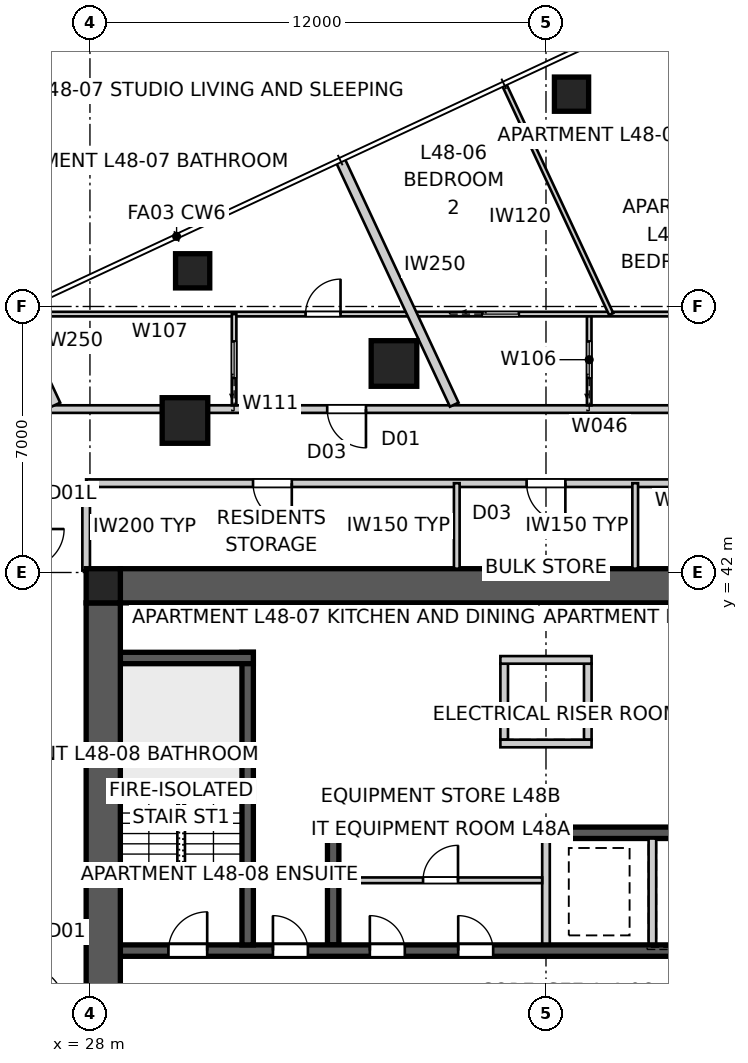
"""IFC4 building model, lengths in metres.
Left out: names, types, materials, properties, quantities, classifications, styles, units other than length and angle.
Written with IfcOpenShell. Run it as: python <this file> out.ifc"""

import sys

from ifc_helpers import new_model, si_unit, direction, frame, frame_2d, origin, origin_2d, place, context, subcontext, project, spatial, polyline, rectangle, outline, extrude, element, fill, save


model = new_model("IFC4")
c1 = context("Model", 3, precision=1e-05, world=origin(), true_north=direction((0.0, 1.0)))
c2 = subcontext(c1, "Body", "Model", "MODEL_VIEW")
j1 = project(units=[si_unit("LENGTHUNIT", "METRE"), si_unit("PLANEANGLEUNIT", "RADIAN")], contexts=[c1])
p1 = place(None, origin())
s1 = spatial("IfcSite", under=j1, at=p1, CompositionType="ELEMENT")
p2 = place(p1, origin())
s2 = spatial("IfcBuilding", under=s1, at=p2, CompositionType="ELEMENT")
p3 = place(p2, frame((0.0, 0.0, 176.0)))
s3 = spatial("IfcBuildingStorey", under=s2, at=p3, CompositionType="ELEMENT", Elevation=176.0)
p4 = place(p3, frame((28.8, 41.65, 0.0), z_axis=(0.0, 0.0, 1.0), x_axis=(1.0, 0.0, 0.0)))
e1 = element("IfcWall", 1, at=p4, inside=s3, PredefinedType="SHEAR", context=c2, shape_type="SweptSolid", body=[
    extrude(outline(polyline([(0.0, -0.45), (22.4, -0.45), (22.4, -0.025), (22.85, -0.025), (22.85, 0.025), (22.4, 0.025), (22.4, 0.45), (0.0, 0.45), (0.0, 0.025), (-0.45, 0.025), (-0.45, -0.025), (0.0, -0.025), (0.0, -0.45)])), origin(), (0.0, 0.0, 1.0), 3.4),
])
p5 = place(p3, frame((28.35, 41.2, 0.0), z_axis=(0.0, 0.0, 1.0), x_axis=(0.0, -1.0, 0.0)))
e2 = element("IfcWall", 2, at=p5, inside=s3, PredefinedType="SHEAR", context=c2, shape_type="SweptSolid", body=[
    extrude(outline(polyline([(0.0, -0.45), (22.4, -0.45), (22.4, -0.025), (22.85, -0.025), (22.85, 0.025), (22.4, 0.025), (22.4, 0.45), (0.0, 0.45), (0.0, 0.025), (-0.45, 0.025), (-0.45, -0.025), (0.0, -0.025), (0.0, -0.45)])), origin(), (0.0, 0.0, 1.0), 3.4),
])
p6 = place(p5, frame((11.14, 0.0, 0.0)))
e3 = element("IfcOpeningElement", 3, at=p6, cuts=e2, PredefinedType="OPENING", context=c2, shape_type="SweptSolid", body=[
    extrude(rectangle(XDim=1.02, YDim=2.4, at=frame_2d((0.51, 1.2))), frame((0.0, 0.46, 0.0), z_axis=(0.0, -1.0, 0.0), x_axis=(1.0, 0.0, 0.0)), (0.0, 0.0, 1.0), 0.92),
])
p7 = place(p3, frame((28.8, 32.05, 0.0), z_axis=(0.0, 0.0, 1.0), x_axis=(1.0, 0.0, 0.0)))
e4 = element("IfcWall", 4, at=p7, inside=s3, PredefinedType="SHEAR", context=c2, shape_type="SweptSolid", body=[
    extrude(rectangle(XDim=22.4, YDim=0.3, at=frame_2d((11.2, 0.0))), origin(), (0.0, 0.0, 1.0), 3.4),
])
p8 = place(p7, frame((19.04, 0.0, 0.0)))
e5 = element("IfcOpeningElement", 5, at=p8, cuts=e4, PredefinedType="OPENING", context=c2, shape_type="SweptSolid", body=[
    extrude(rectangle(XDim=0.92, YDim=2.1, at=frame_2d((0.46, 1.05))), frame((0.0, 0.16, 0.0), z_axis=(0.0, -1.0, 0.0), x_axis=(1.0, 0.0, 0.0)), (0.0, 0.0, 1.0), 0.32),
])
p9 = place(p7, frame((1.265, 0.0, 0.0)))
e6 = element("IfcOpeningElement", 6, at=p9, cuts=e4, PredefinedType="OPENING", context=c2, shape_type="SweptSolid", body=[
    extrude(rectangle(XDim=1.02, YDim=2.1, at=frame_2d((0.51, 1.05))), frame((0.0, 0.16, 0.0), z_axis=(0.0, -1.0, 0.0), x_axis=(1.0, 0.0, 0.0)), (0.0, 0.0, 1.0), 0.32),
])
p10 = place(p7, frame((4.015, 0.0, 0.0)))
e7 = element("IfcOpeningElement", 7, at=p10, cuts=e4, PredefinedType="OPENING", context=c2, shape_type="SweptSolid", body=[
    extrude(rectangle(XDim=0.92, YDim=2.1, at=frame_2d((0.46, 1.05))), frame((0.0, 0.16, 0.0), z_axis=(0.0, -1.0, 0.0), x_axis=(1.0, 0.0, 0.0)), (0.0, 0.0, 1.0), 0.32),
])
p11 = place(p7, frame((6.565, 0.0, 0.0)))
e8 = element("IfcOpeningElement", 8, at=p11, cuts=e4, PredefinedType="OPENING", context=c2, shape_type="SweptSolid", body=[
    extrude(rectangle(XDim=0.92, YDim=2.1, at=frame_2d((0.46, 1.05))), frame((0.0, 0.16, 0.0), z_axis=(0.0, -1.0, 0.0), x_axis=(1.0, 0.0, 0.0)), (0.0, 0.0, 1.0), 0.32),
])
p12 = place(p7, frame((8.89, 0.0, 0.0)))
e9 = element("IfcOpeningElement", 9, at=p12, cuts=e4, PredefinedType="OPENING", context=c2, shape_type="SweptSolid", body=[
    extrude(rectangle(XDim=0.92, YDim=2.1, at=frame_2d((0.46, 1.05))), frame((0.0, 0.16, 0.0), z_axis=(0.0, -1.0, 0.0), x_axis=(1.0, 0.0, 0.0)), (0.0, 0.0, 1.0), 0.32),
])
p13 = place(p7, frame((14.85, 0.0, 0.0)))
e10 = element("IfcOpeningElement", 10, at=p13, cuts=e4, PredefinedType="OPENING", context=c2, shape_type="SweptSolid", body=[
    extrude(rectangle(XDim=1.1, YDim=2.1, at=frame_2d((0.55, 1.05))), frame((0.0, 0.16, 0.0), z_axis=(0.0, -1.0, 0.0), x_axis=(1.0, 0.0, 0.0)), (0.0, 0.0, 1.0), 0.32),
])
p14 = place(p3, frame((34.25, 35.15, 0.0), z_axis=(0.0, 0.0, 1.0), x_axis=(1.0, 0.0, 0.0)))
e11 = element("IfcWall", 11, at=p14, inside=s3, PredefinedType="SHEAR", context=c2, shape_type="SweptSolid", body=[
    extrude(rectangle(XDim=11.5, YDim=0.3, at=frame_2d((5.75, 0.0))), origin(), (0.0, 0.0, 1.0), 3.4),
])
p15 = place(p3, frame((34.4, 32.2, 0.0), z_axis=(0.0, 0.0, 1.0), x_axis=(0.0, 1.0, 0.0)))
e12 = element("IfcWall", 12, at=p15, inside=s3, PredefinedType="SHEAR", context=c2, shape_type="SweptSolid", body=[
    extrude(rectangle(XDim=2.8, YDim=0.3, at=frame_2d((1.4, 0.0))), origin(), (0.0, 0.0, 1.0), 3.4),
])
for number, where, z_axis, x_axis in (
    (13, (40.0, 32.2, 0.0), (0.0, 0.0, 1.0), (0.0, 1.0, 0.0)),
    (14, (42.8, 32.2, 0.0), (0.0, 0.0, 1.0), (0.0, 1.0, 0.0)),
):
    element("IfcWall", number, at=place(p3, frame(where, z_axis=z_axis, x_axis=x_axis)), inside=s3, PredefinedType="SOLIDWALL", context=c2, shape_type="SweptSolid", body=[
        extrude(rectangle(XDim=2.8, YDim=0.2, at=frame_2d((1.4, 0.0))), origin(), (0.0, 0.0, 1.0), 3.4),
    ])
p16 = place(p3, frame((32.15, 32.2, 0.0), z_axis=(0.0, 0.0, 1.0), x_axis=(0.0, 1.0, 0.0)))
e15 = element("IfcWall", 15, at=p16, inside=s3, PredefinedType="SHEAR", context=c2, shape_type="SweptSolid", body=[
    extrude(rectangle(XDim=7.7, YDim=0.3, at=frame_2d((3.85, 0.0))), origin(), (0.0, 0.0, 1.0), 3.4),
])
p17 = place(p3, frame((28.8, 39.75, 0.0), z_axis=(0.0, 0.0, 1.0), x_axis=(1.0, 0.0, 0.0)))
e16 = element("IfcWall", 16, at=p17, inside=s3, PredefinedType="SHEAR", context=c2, shape_type="SweptSolid", body=[
    extrude(rectangle(XDim=3.5, YDim=0.3, at=frame_2d((1.75, 0.0))), origin(), (0.0, 0.0, 1.0), 3.4),
])
for number, where, z_axis, x_axis in (
    (17, (38.9, 37.6, 0.0), (0.0, 0.0, 1.0), (0.0, 1.0, 0.0)),
    (18, (41.1, 37.6, 0.0), (0.0, 0.0, 1.0), (0.0, 1.0, 0.0)),
):
    element("IfcWall", number, at=place(p3, frame(where, z_axis=z_axis, x_axis=x_axis)), inside=s3, PredefinedType="SOLIDWALL", context=c2, shape_type="SweptSolid", body=[
        extrude(rectangle(XDim=2.0, YDim=0.2, at=frame_2d((1.0, 0.0))), origin(), (0.0, 0.0, 1.0), 3.4),
    ])
for number, where, z_axis, x_axis in (
    (19, (38.8, 37.5, 0.0), (0.0, 0.0, 1.0), (1.0, 0.0, 0.0)),
    (20, (38.8, 39.7, 0.0), (0.0, 0.0, 1.0), (1.0, 0.0, 0.0)),
):
    element("IfcWall", number, at=place(p3, frame(where, z_axis=z_axis, x_axis=x_axis)), inside=s3, PredefinedType="SOLIDWALL", context=c2, shape_type="SweptSolid", body=[
        extrude(rectangle(XDim=2.4, YDim=0.2, at=frame_2d((1.2, 0.0))), origin(), (0.0, 0.0, 1.0), 3.4),
    ])
p18 = place(p3, frame((28.35, 41.65, 0.0), z_axis=(0.0, 0.0, 1.0), x_axis=(1.0, 0.0, 0.0)))
e21 = element("IfcColumn", 21, at=p18, inside=s3, PredefinedType="COLUMN", context=c2, shape_type="SweptSolid", body=[
    extrude(rectangle(XDim=0.9, YDim=0.9, at=origin_2d()), origin(), (0.0, 0.0, 1.0), 3.4),
])
for number, where, z_axis, x_axis in (
    (22, (40.672, 54.588, -0.15), (0.0, 0.0, 1.0), (1.0, 0.0, 0.0)),
    (23, (30.702, 49.939, -0.15), (0.0, 0.0, 1.0), (1.0, 0.0, 0.0)),
):
    element("IfcColumn", number, at=place(p3, frame(where, z_axis=z_axis, x_axis=x_axis)), inside=s3, PredefinedType="COLUMN", context=c2, shape_type="SweptSolid", body=[
        extrude(rectangle(XDim=0.9, YDim=0.9, at=origin_2d()), origin(), (0.0, 0.0, 1.0), 3.55),
    ])
for number, where, z_axis, x_axis in (
    (24, (36.0, 47.5, 0.0), (0.0, 0.0, 1.0), (1.0, 0.0, 0.0)),
    (25, (30.5, 46.0, 0.0), (0.0, 0.0, 1.0), (1.0, 0.0, 0.0)),
):
    element("IfcColumn", number, at=place(p3, frame(where, z_axis=z_axis, x_axis=x_axis)), inside=s3, PredefinedType="COLUMN", context=c2, shape_type="SweptSolid", body=[
        extrude(rectangle(XDim=1.2, YDim=1.2, at=origin_2d()), origin(), (0.0, 0.0, 1.0), 3.4),
    ])
p19 = place(p3, frame((47.558, 46.3, 0.0), z_axis=(0.0, 0.0, 1.0), x_axis=(-1.0, 0.0, 0.0)))
e26 = element("IfcWall", 26, at=p19, inside=s3, PredefinedType="PARTITIONING", context=c2, shape_type="SweptSolid", body=[
    extrude(rectangle(XDim=15.117, YDim=0.2, at=frame_2d((7.558, 0.0))), origin(), (0.0, 0.0, 1.0), 3.25),
])
p20 = place(p19, frame((12.295, 0.0, 0.0)))
e27 = element("IfcOpeningElement", 27, at=p20, cuts=e26, PredefinedType="OPENING", context=c2, shape_type="SweptSolid", body=[
    extrude(rectangle(XDim=1.02, YDim=2.34, at=frame_2d((0.51, 1.17))), frame((0.0, 0.11, 0.0), z_axis=(0.0, -1.0, 0.0), x_axis=(1.0, 0.0, 0.0)), (0.0, 0.0, 1.0), 0.22),
])
p21 = place(p3, frame((32.442, 46.3, 0.0), z_axis=(0.0, 0.0, 1.0), x_axis=(-1.0, 0.0, 0.0)))
e28 = element("IfcWall", 28, at=p21, inside=s3, PredefinedType="PARTITIONING", context=c2, shape_type="SweptSolid", body=[
    extrude(rectangle(XDim=1.683, YDim=0.2, at=frame_2d((0.842, 0.0))), origin(), (0.0, 0.0, 1.0), 2.55),
])
p22 = place(p3, frame((30.758, 46.3, 0.0), z_axis=(0.0, 0.0, 1.0), x_axis=(-1.0, 0.0, 0.0)))
e29 = element("IfcWall", 29, at=p22, inside=s3, PredefinedType="PARTITIONING", context=c2, shape_type="SweptSolid", body=[
    extrude(rectangle(XDim=4.458, YDim=0.2, at=frame_2d((2.229, 0.0))), origin(), (0.0, 0.0, 1.0), 3.25),
])
p23 = place(p3, frame((34.585, 52.853, 0.0), z_axis=(0.0, 0.0, 1.0), x_axis=(0.422623839356, -0.906305186131, 0.0)))
e30 = element("IfcWall", 30, at=p23, inside=s3, PredefinedType="PARTITIONING", context=c2, shape_type="SweptSolid", body=[
    extrude(rectangle(XDim=7.101, YDim=0.25, at=frame_2d((3.551, 0.0))), origin(), (0.0, 0.0, 1.0), 3.25),
])
p24 = place(p3, frame((25.975, 48.838, 0.0), z_axis=(0.0, 0.0, 1.0), x_axis=(0.422590257842, -0.906320844943, 0.0)))
e31 = element("IfcWall", 31, at=p24, inside=s3, PredefinedType="PARTITIONING", context=c2, shape_type="SweptSolid", body=[
    extrude(rectangle(XDim=2.671, YDim=0.25, at=frame_2d((1.336, 0.0))), origin(), (0.0, 0.0, 1.0), 3.25),
])
p25 = place(p3, frame((52.1, 44.35, 0.0), z_axis=(0.0, 0.0, 1.0), x_axis=(-1.0, 0.0, 0.0)))
e32 = element("IfcWall", 32, at=p25, inside=s3, PredefinedType="PARTITIONING", context=c2, shape_type="SweptSolid", body=[
    extrude(rectangle(XDim=24.2, YDim=0.2, at=frame_2d((12.1, 0.0))), origin(), (0.0, 0.0, 1.0), 3.25),
])
p26 = place(p25, frame((18.789, 0.0, 0.0)))
e33 = element("IfcOpeningElement", 33, at=p26, cuts=e32, PredefinedType="OPENING", context=c2, shape_type="SweptSolid", body=[
    extrude(rectangle(XDim=1.02, YDim=2.1, at=frame_2d((0.51, 1.05))), frame((0.0, 0.11, 0.0), z_axis=(0.0, -1.0, 0.0), x_axis=(1.0, 0.0, 0.0)), (0.0, 0.0, 1.0), 0.22),
])
p27 = place(p25, frame((4.391, 0.0, 0.0)))
e34 = element("IfcOpeningElement", 34, at=p27, cuts=e32, PredefinedType="OPENING", context=c2, shape_type="SweptSolid", body=[
    extrude(rectangle(XDim=1.02, YDim=2.1, at=frame_2d((0.51, 1.05))), frame((0.0, 0.11, 0.0), z_axis=(0.0, -1.0, 0.0), x_axis=(1.0, 0.0, 0.0)), (0.0, 0.0, 1.0), 0.22),
])
p28 = place(p25, frame((11.59, 0.0, 0.0)))
e35 = element("IfcOpeningElement", 35, at=p28, cuts=e32, PredefinedType="OPENING", context=c2, shape_type="SweptSolid", body=[
    extrude(rectangle(XDim=1.02, YDim=2.1, at=frame_2d((0.51, 1.05))), frame((0.0, 0.11, 0.0), z_axis=(0.0, -1.0, 0.0), x_axis=(1.0, 0.0, 0.0)), (0.0, 0.0, 1.0), 0.22),
])
p29 = place(p3, frame((27.9, 44.35, 0.0), z_axis=(0.0, 0.0, 1.0), x_axis=(0.0, -1.0, 0.0)))
e36 = element("IfcWall", 36, at=p29, inside=s3, PredefinedType="PARTITIONING", context=c2, shape_type="SweptSolid", body=[
    extrude(rectangle(XDim=2.3, YDim=0.2, at=frame_2d((1.15, 0.0))), origin(), (0.0, 0.0, 1.0), 3.25),
])
for number, where, z_axis, x_axis in (
    (37, (37.653, 42.1, 0.0), (0.0, 0.0, 1.0), (0.0, 1.0, 0.0)),
    (38, (42.347, 42.1, 0.0), (0.0, 0.0, 1.0), (0.0, 1.0, 0.0)),
):
    element("IfcWall", number, at=place(p3, frame(where, z_axis=z_axis, x_axis=x_axis)), inside=s3, PredefinedType="SOLIDWALL", context=c2, shape_type="SweptSolid", body=[
        extrude(rectangle(XDim=2.25, YDim=0.15, at=frame_2d((1.125, 0.0))), origin(), (0.0, 0.0, 1.0), 3.25),
    ])
p30 = place(p3, frame((41.137, 46.4, 0.0), z_axis=(0.0, 0.0, 1.0), x_axis=(0.0, 1.0, 0.0)))
e39 = element("IfcWall", 39, at=p30, inside=s3, PredefinedType="PARTITIONING", context=c2, shape_type="SweptSolid", body=[
    extrude(rectangle(XDim=2.4, YDim=0.12, at=frame_2d((1.2, 0.0))), origin(), (0.0, 0.0, 1.0), 3.25),
])
p31 = place(p30, frame((0.72, 0.0, 0.0)))
e40 = element("IfcOpeningElement", 40, at=p31, cuts=e39, PredefinedType="OPENING", context=c2, shape_type="SweptSolid", body=[
    extrude(rectangle(XDim=0.96, YDim=2.1, at=frame_2d((0.48, 1.05))), frame((0.0, 0.07, 0.0), z_axis=(0.0, -1.0, 0.0), x_axis=(1.0, 0.0, 0.0)), (0.0, 0.0, 1.0), 0.14),
])
p32 = place(p3, frame((25.993, 48.8, 0.0), z_axis=(0.0, 0.0, 1.0), x_axis=(1.0, 0.0, 0.0)))
e41 = element("IfcWall", 41, at=p32, inside=s3, PredefinedType="PARTITIONING", context=c2, shape_type="SweptSolid", body=[
    extrude(rectangle(XDim=20.724, YDim=0.12, at=frame_2d((10.362, 0.0))), origin(), (0.0, 0.0, 1.0), 3.25),
])
p33 = place(p32, frame((7.681, 0.0, 0.0)))
e42 = element("IfcOpeningElement", 42, at=p33, cuts=e41, PredefinedType="OPENING", context=c2, shape_type="SweptSolid", body=[
    extrude(rectangle(XDim=0.92, YDim=2.34, at=frame_2d((0.46, 1.17))), frame((0.0, 0.07, 0.0), z_axis=(0.0, -1.0, 0.0), x_axis=(1.0, 0.0, 0.0)), (0.0, 0.0, 1.0), 0.14),
])
p34 = place(p32, frame((18.766, 0.0, 0.0)))
e43 = element("IfcOpeningElement", 43, at=p34, cuts=e41, PredefinedType="OPENING", context=c2, shape_type="SweptSolid", body=[
    extrude(rectangle(XDim=0.96, YDim=2.1, at=frame_2d((0.48, 1.05))), frame((0.0, 0.07, 0.0), z_axis=(0.0, -1.0, 0.0), x_axis=(1.0, 0.0, 0.0)), (0.0, 0.0, 1.0), 0.14),
])
p35 = place(p32, frame((12.333, 0.0, 0.0)))
e44 = element("IfcOpeningElement", 44, at=p35, cuts=e41, PredefinedType="OPENING", context=c2, shape_type="SweptSolid", body=[
    extrude(rectangle(XDim=0.96, YDim=2.1, at=frame_2d((0.48, 1.05))), frame((0.0, 0.07, 0.0), z_axis=(0.0, -1.0, 0.0), x_axis=(1.0, 0.0, 0.0)), (0.0, 0.0, 1.0), 0.14),
])
p36 = place(p3, frame((46.893, 48.937, 0.0), z_axis=(0.0, 0.0, 1.0), x_axis=(-0.422638395676, 0.906298398156, 0.0)))
e45 = element("IfcWall", 45, at=p36, inside=s3, PredefinedType="PARTITIONING", context=c2, shape_type="SweptSolid", body=[
    extrude(rectangle(XDim=8.71, YDim=0.12, at=frame_2d((4.355, 0.0))), origin(), (0.0, 0.0, 1.0), 3.25),
])
p37 = place(p3, frame((41.716, 48.8, 0.0), z_axis=(0.0, 0.0, 1.0), x_axis=(-0.422642131948, 0.906296655793, 0.0)))
e46 = element("IfcWall", 46, at=p37, inside=s3, PredefinedType="PARTITIONING", context=c2, shape_type="SweptSolid", body=[
    extrude(rectangle(XDim=6.646, YDim=0.12, at=frame_2d((3.323, 0.0))), origin(), (0.0, 0.0, 1.0), 3.25),
])
p38 = place(p3, frame((31.793, 46.4, 0.0), z_axis=(0.0, 0.0, 1.0), x_axis=(0.0, 1.0, 0.0)))
e47 = element("IfcWall", 47, at=p38, inside=s3, PredefinedType="PARTITIONING", context=c2, shape_type="SweptSolid", body=[
    extrude(rectangle(XDim=2.4, YDim=0.12, at=frame_2d((1.2, 0.0))), origin(), (0.0, 0.0, 1.0), 3.25),
])
p39 = place(p38, frame((0.72, 0.0, 0.0)))
e48 = element("IfcOpeningElement", 48, at=p39, cuts=e47, PredefinedType="OPENING", context=c2, shape_type="SweptSolid", body=[
    extrude(rectangle(XDim=0.96, YDim=2.1, at=frame_2d((0.48, 1.05))), frame((0.0, 0.07, 0.0), z_axis=(0.0, -1.0, 0.0), x_axis=(1.0, 0.0, 0.0)), (0.0, 0.0, 1.0), 0.14),
])
p40 = place(p3, frame((34.55, 33.9, 0.0), z_axis=(0.0, 0.0, 1.0), x_axis=(1.0, 0.0, 0.0)))
e49 = element("IfcWall", 49, at=p40, inside=s3, PredefinedType="SOLIDWALL", context=c2, shape_type="SweptSolid", body=[
    extrude(rectangle(XDim=5.35, YDim=0.15, at=frame_2d((2.675, 0.0))), origin(), (0.0, 0.0, 1.0), 3.25),
])
p41 = place(p40, frame((2.215, 0.0, 0.0)))
e50 = element("IfcOpeningElement", 50, at=p41, cuts=e49, PredefinedType="OPENING", context=c2, shape_type="SweptSolid", body=[
    extrude(rectangle(XDim=0.92, YDim=2.1, at=frame_2d((0.46, 1.05))), frame((0.0, 0.085, 0.0), z_axis=(0.0, -1.0, 0.0), x_axis=(1.0, 0.0, 0.0)), (0.0, 0.0, 1.0), 0.17),
])
p42 = place(p9, origin())
e51 = element("IfcDoor", 51, at=p42, inside=s3, OperationType="SINGLE_SWING_RIGHT", PredefinedType="DOOR", context=c2, shape_type="SweptSolid", body=[
    extrude(rectangle(XDim=1.02, YDim=2.1, at=frame_2d((0.51, 1.05))), frame((0.0, 0.025, 0.0), z_axis=(0.0, -1.0, 0.0), x_axis=(1.0, 0.0, 0.0)), (0.0, 0.0, 1.0), 0.05),
])
fill(e6, e51)
p43 = place(p10, origin())
e52 = element("IfcDoor", 52, at=p43, inside=s3, OperationType="SINGLE_SWING_LEFT", PredefinedType="DOOR", context=c2, shape_type="SweptSolid", body=[
    extrude(rectangle(XDim=0.92, YDim=2.1, at=frame_2d((0.46, 1.05))), frame((0.0, 0.025, 0.0), z_axis=(0.0, -1.0, 0.0), x_axis=(1.0, 0.0, 0.0)), (0.0, 0.0, 1.0), 0.05),
])
fill(e7, e52)
p44 = place(p26, origin())
e53 = element("IfcDoor", 53, at=p44, inside=s3, OperationType="SINGLE_SWING_LEFT", PredefinedType="DOOR", context=c2, shape_type="SweptSolid", body=[
    extrude(rectangle(XDim=1.02, YDim=2.1, at=frame_2d((0.51, 1.05))), frame((0.0, 0.025, 0.0), z_axis=(0.0, -1.0, 0.0), x_axis=(1.0, 0.0, 0.0)), (0.0, 0.0, 1.0), 0.05),
])
fill(e33, e53)
p45 = place(p20, origin())
e54 = element("IfcDoor", 54, at=p45, inside=s3, OperationType="SINGLE_SWING_LEFT", PredefinedType="DOOR", context=c2, shape_type="SweptSolid", body=[
    extrude(rectangle(XDim=1.02, YDim=2.34, at=frame_2d((0.51, 1.17))), frame((0.0, 0.025, 0.0), z_axis=(0.0, -1.0, 0.0), x_axis=(1.0, 0.0, 0.0)), (0.0, 0.0, 1.0), 0.05),
])
fill(e27, e54)
p46 = place(p28, origin())
e55 = element("IfcDoor", 55, at=p46, inside=s3, OperationType="SINGLE_SWING_LEFT", PredefinedType="DOOR", context=c2, shape_type="SweptSolid", body=[
    extrude(rectangle(XDim=1.02, YDim=2.1, at=frame_2d((0.51, 1.05))), frame((0.0, 0.025, 0.0), z_axis=(0.0, -1.0, 0.0), x_axis=(1.0, 0.0, 0.0)), (0.0, 0.0, 1.0), 0.05),
])
fill(e35, e55)
p47 = place(p33, origin())
e56 = element("IfcDoor", 56, at=p47, inside=s3, OperationType="SINGLE_SWING_RIGHT", PredefinedType="DOOR", context=c2, shape_type="SweptSolid", body=[
    extrude(rectangle(XDim=0.92, YDim=2.34, at=frame_2d((0.46, 1.17))), frame((0.0, 0.025, 0.0), z_axis=(0.0, -1.0, 0.0), x_axis=(1.0, 0.0, 0.0)), (0.0, 0.0, 1.0), 0.05),
])
fill(e42, e56)
p48 = place(p39, origin())
e57 = element("IfcDoor", 57, at=p48, inside=s3, OperationType="SLIDING_TO_LEFT", PredefinedType="DOOR", context=c2, shape_type="SweptSolid", body=[
    extrude(rectangle(XDim=0.96, YDim=2.1, at=frame_2d((0.48, 1.05))), frame((0.0, 0.025, 0.0), z_axis=(0.0, -1.0, 0.0), x_axis=(1.0, 0.0, 0.0)), (0.0, 0.0, 1.0), 0.05),
])
fill(e48, e57)
p49 = place(p31, origin())
e58 = element("IfcDoor", 58, at=p49, inside=s3, OperationType="SLIDING_TO_LEFT", PredefinedType="DOOR", context=c2, shape_type="SweptSolid", body=[
    extrude(rectangle(XDim=0.96, YDim=2.1, at=frame_2d((0.48, 1.05))), frame((0.0, 0.025, 0.0), z_axis=(0.0, -1.0, 0.0), x_axis=(1.0, 0.0, 0.0)), (0.0, 0.0, 1.0), 0.05),
])
fill(e40, e58)
p50 = place(p35, origin())
e59 = element("IfcDoor", 59, at=p50, inside=s3, OperationType="SLIDING_TO_LEFT", PredefinedType="DOOR", context=c2, shape_type="SweptSolid", body=[
    extrude(rectangle(XDim=0.96, YDim=2.1, at=frame_2d((0.48, 1.05))), frame((0.0, 0.025, 0.0), z_axis=(0.0, -1.0, 0.0), x_axis=(1.0, 0.0, 0.0)), (0.0, 0.0, 1.0), 0.05),
])
fill(e44, e59)
p51 = place(p11, origin())
e60 = element("IfcDoor", 60, at=p51, inside=s3, OperationType="SINGLE_SWING_LEFT", PredefinedType="DOOR", context=c2, shape_type="SweptSolid", body=[
    extrude(rectangle(XDim=0.92, YDim=2.1, at=frame_2d((0.46, 1.05))), frame((0.0, 0.025, 0.0), z_axis=(0.0, -1.0, 0.0), x_axis=(1.0, 0.0, 0.0)), (0.0, 0.0, 1.0), 0.05),
])
fill(e8, e60)
p52 = place(p12, origin())
e61 = element("IfcDoor", 61, at=p52, inside=s3, OperationType="SINGLE_SWING_LEFT", PredefinedType="DOOR", context=c2, shape_type="SweptSolid", body=[
    extrude(rectangle(XDim=0.92, YDim=2.1, at=frame_2d((0.46, 1.05))), frame((0.0, 0.025, 0.0), z_axis=(0.0, -1.0, 0.0), x_axis=(1.0, 0.0, 0.0)), (0.0, 0.0, 1.0), 0.05),
])
fill(e9, e61)
p53 = place(p41, origin())
e62 = element("IfcDoor", 62, at=p53, inside=s3, OperationType="SINGLE_SWING_RIGHT", PredefinedType="DOOR", context=c2, shape_type="SweptSolid", body=[
    extrude(rectangle(XDim=0.92, YDim=2.1, at=frame_2d((0.46, 1.05))), frame((0.0, 0.025, 0.0), z_axis=(0.0, -1.0, 0.0), x_axis=(1.0, 0.0, 0.0)), (0.0, 0.0, 1.0), 0.05),
])
fill(e50, e62)
save(model, sys.argv[1])
